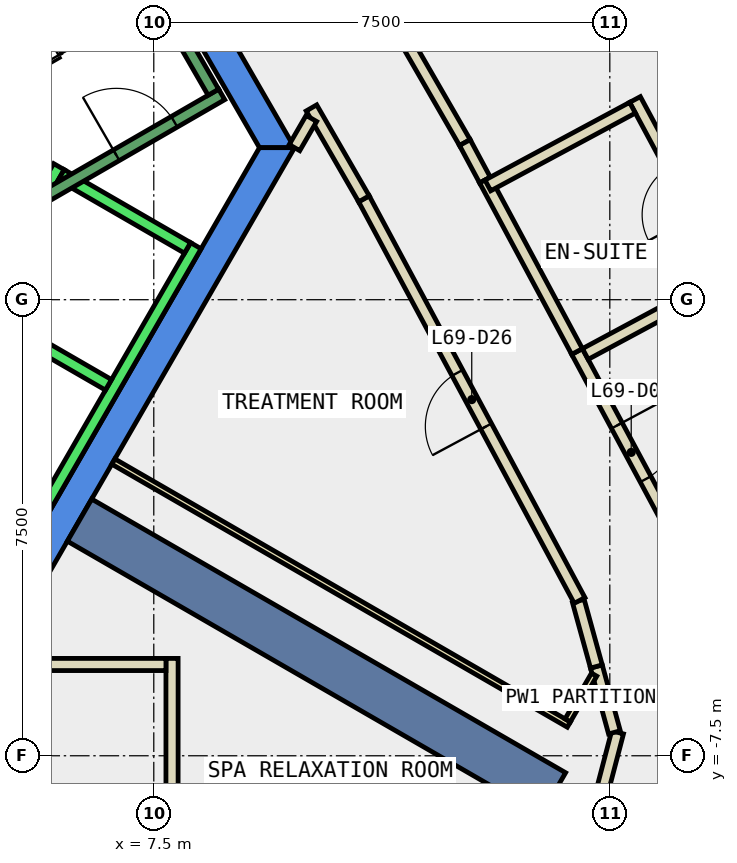
"""IFC4 building model, lengths in metres.
Left out: names, types, materials, properties, quantities, classifications, styles, units other than length and angle.
Written with IfcOpenShell. Run it as: python <this file> out.ifc"""

import sys

from ifc_helpers import new_model, si_unit, direction, frame, frame_2d, origin, place, context, subcontext, project, spatial, polyline, rectangle, outline, extrude, element, fill, save


model = new_model("IFC4")
c1 = context("Model", 3, precision=1e-05, world=origin(), true_north=direction((0.0, 1.0)))
c2 = subcontext(c1, "Body", "Model", "MODEL_VIEW")
j1 = project(units=[si_unit("LENGTHUNIT", "METRE"), si_unit("PLANEANGLEUNIT", "RADIAN")], contexts=[c1])
p1 = place(None, origin())
s1 = spatial("IfcSite", under=j1, at=p1, CompositionType="ELEMENT")
p2 = place(p1, origin())
s2 = spatial("IfcBuilding", under=s1, at=p2, CompositionType="ELEMENT")
p3 = place(p2, frame((0.0, 0.0, 297.2)))
s3 = spatial("IfcBuildingStorey", under=s2, at=p3, CompositionType="ELEMENT", Elevation=297.2)
p4 = place(p3, frame((0.0, 0.0, -0.34)))
e1 = element("IfcWall", 1, at=p4, inside=s3, PredefinedType="SHEAR", context=c2, shape_type="SweptSolid", body=[
    extrude(outline(polyline([(5.486, 9.998), (5.053, 9.748), (9.238, 2.5), (9.815, 2.5), (5.486, 9.998)])), origin(), (0.0, 0.0, 1.0), 3.6),
])
p5 = place(p3, frame((0.0, 0.0, -0.34)))
e2 = element("IfcWall", 2, at=p5, inside=s3, PredefinedType="SHEAR", context=c2, shape_type="SweptSolid", body=[
    extrude(outline(polyline([(4.907, -6.0), (9.815, 2.5), (9.238, 2.5), (4.619, -5.5), (4.907, -6.0)])), origin(), (0.0, 0.0, 1.0), 3.6),
])
p6 = place(p3, frame((6.279, -3.625, -0.34), z_axis=(0.0, 0.0, 1.0), x_axis=(0.866017533419, -0.500013631625, 0.0)))
e3 = element("IfcWall", 3, at=p6, inside=s3, PredefinedType="SHEAR", context=c2, shape_type="SweptSolid", body=[
    extrude(rectangle(XDim=9.0, YDim=0.8, at=frame_2d((4.5, 0.0))), origin(), (0.0, 0.0, 1.0), 3.6),
])
p7 = place(p3, frame((14.785, -8.425, 0.0), z_axis=(0.0, 0.0, 1.0), x_axis=(0.253295121261, 0.967389053869, 0.0)))
e4 = element("IfcWall", 4, at=p7, inside=s3, PredefinedType="PARTITIONING", context=c2, shape_type="SweptSolid", body=[
    extrude(rectangle(XDim=1.354, YDim=0.2, at=frame_2d((0.677, 0.0))), origin(), (0.0, 0.0, 1.0), 3.26),
])
p8 = place(p3, frame((15.076, -7.115, 0.0), z_axis=(0.0, 0.0, 1.0), x_axis=(-0.264368116744, 0.964421846937, 0.0)))
e5 = element("IfcWall", 5, at=p8, inside=s3, PredefinedType="PARTITIONING", context=c2, shape_type="SweptSolid", body=[
    extrude(rectangle(XDim=1.123, YDim=0.2, at=frame_2d((0.562, 0.0))), origin(), (0.0, 0.0, 1.0), 3.26),
])
p9 = place(p3, frame((14.779, -6.032, 0.0), z_axis=(0.0, 0.0, 1.0), x_axis=(-0.265740072272, 0.964044715762, 0.0)))
e6 = element("IfcWall", 6, at=p9, inside=s3, PredefinedType="PARTITIONING", context=c2, shape_type="SweptSolid", body=[
    extrude(rectangle(XDim=1.118, YDim=0.2, at=frame_2d((0.559, 0.0))), origin(), (0.0, 0.0, 1.0), 3.26),
])
p10 = place(p3, frame((14.503, -4.946, 0.0), z_axis=(0.0, 0.0, 1.0), x_axis=(-0.473101362557, 0.881008002658, 0.0)))
e7 = element("IfcWall", 7, at=p10, inside=s3, PredefinedType="PARTITIONING", context=c2, shape_type="SweptSolid", body=[
    extrude(rectangle(XDim=7.497, YDim=0.2, at=frame_2d((3.749, 0.0))), origin(), (0.0, 0.0, 1.0), 3.26),
])
p11 = place(p10, frame((3.249, 0.0, 0.0)))
e8 = element("IfcOpeningElement", 8, at=p11, cuts=e7, PredefinedType="OPENING", context=c2, shape_type="SweptSolid", body=[
    extrude(rectangle(XDim=1.0, YDim=2.1, at=frame_2d((0.5, 1.05))), frame((0.0, 0.11, 0.0), z_axis=(0.0, -1.0, 0.0), x_axis=(1.0, 0.0, 0.0)), (0.0, 0.0, 1.0), 0.22),
])
p12 = place(p3, frame((10.956, 1.659, 0.0), z_axis=(0.0, 0.0, 1.0), x_axis=(-0.49992648901, 0.866067841215, 0.0)))
e9 = element("IfcWall", 9, at=p12, inside=s3, PredefinedType="PARTITIONING", context=c2, shape_type="SweptSolid", body=[
    extrude(rectangle(XDim=1.726, YDim=0.2, at=frame_2d((0.863, 0.0))), origin(), (0.0, 0.0, 1.0), 3.26),
])
p13 = place(p3, frame((10.092, 2.981, 0.0), z_axis=(0.0, 0.0, 1.0), x_axis=(-0.501296484717, -0.865275582927, 0.0)))
e10 = element("IfcWall", 10, at=p13, inside=s3, PredefinedType="PARTITIONING", context=c2, shape_type="SweptSolid", body=[
    extrude(rectangle(XDim=0.555, YDim=0.2, at=frame_2d((0.277, 0.0))), origin(), (0.0, 0.0, 1.0), 3.26),
])
p14 = place(p3, frame((14.461, -0.852, 0.0), z_axis=(0.0, 0.0, 1.0), x_axis=(0.473160180459, -0.88097641491, 0.0)))
e11 = element("IfcWall", 11, at=p14, inside=s3, PredefinedType="PARTITIONING", context=c2, shape_type="SweptSolid", body=[
    extrude(rectangle(XDim=3.766, YDim=0.2, at=frame_2d((1.883, 0.0))), origin(), (0.0, 0.0, 1.0), 3.26),
])
p15 = place(p14, frame((1.383, 0.0, 0.0)))
e12 = element("IfcOpeningElement", 12, at=p15, cuts=e11, PredefinedType="OPENING", context=c2, shape_type="SweptSolid", body=[
    extrude(rectangle(XDim=1.0, YDim=2.1, at=frame_2d((0.5, 1.05))), frame((0.0, 0.11, 0.0), z_axis=(0.0, -1.0, 0.0), x_axis=(1.0, 0.0, 0.0)), (0.0, 0.0, 1.0), 0.22),
])
p16 = place(p3, frame((10.618, 6.044, 0.0), z_axis=(0.0, 0.0, 1.0), x_axis=(0.50008212199, -0.86597798544, 0.0)))
e13 = element("IfcWall", 13, at=p16, inside=s3, PredefinedType="PARTITIONING", context=c2, shape_type="SweptSolid", body=[
    extrude(rectangle(XDim=3.995, YDim=0.2, at=frame_2d((1.998, 0.0))), origin(), (0.0, 0.0, 1.0), 3.26),
])
p17 = place(p3, frame((12.616, 2.584, 0.0), z_axis=(0.0, 0.0, 1.0), x_axis=(0.472830911699, -0.881153181315, 0.0)))
e14 = element("IfcWall", 14, at=p17, inside=s3, PredefinedType="PARTITIONING", context=c2, shape_type="SweptSolid", body=[
    extrude(rectangle(XDim=0.7, YDim=0.2, at=frame_2d((0.35, 0.0))), origin(), (0.0, 0.0, 1.0), 3.26),
])
p18 = place(p3, frame((12.947, 1.967, 0.0), z_axis=(0.0, 0.0, 1.0), x_axis=(0.473116768279, -0.88099972961, 0.0)))
e15 = element("IfcWall", 15, at=p18, inside=s3, PredefinedType="PARTITIONING", context=c2, shape_type="SweptSolid", body=[
    extrude(rectangle(XDim=3.2, YDim=0.2, at=frame_2d((1.6, 0.0))), origin(), (0.0, 0.0, 1.0), 3.26),
])
p19 = place(p3, frame((7.8, -5.899, 0.0), z_axis=(0.0, 0.0, 1.0), x_axis=(0.0, -1.0, 0.0)))
e16 = element("IfcWall", 16, at=p19, inside=s3, PredefinedType="PARTITIONING", context=c2, shape_type="SweptSolid", body=[
    extrude(rectangle(XDim=4.66, YDim=0.2, at=frame_2d((2.33, 0.0))), origin(), (0.0, 0.0, 1.0), 3.26),
])
p20 = place(p3, frame((6.835, -2.662, 0.0), z_axis=(0.0, 0.0, 1.0), x_axis=(0.866023427642, -0.500003422764, 0.0)))
e17 = element("IfcWall", 17, at=p20, inside=s3, PredefinedType="PARTITIONING", context=c2, shape_type="SweptSolid", body=[
    extrude(rectangle(XDim=8.65, YDim=0.1, at=frame_2d((4.325, 0.0))), origin(), (0.0, 0.0, 1.0), 3.26),
])
p21 = place(p3, frame((14.307, -6.919, 0.0), z_axis=(0.0, 0.0, 1.0), x_axis=(0.500305662732, 0.865848857387, 0.0)))
e18 = element("IfcWall", 18, at=p21, inside=s3, PredefinedType="PARTITIONING", context=c2, shape_type="SweptSolid", body=[
    extrude(rectangle(XDim=0.87, YDim=0.1, at=frame_2d((0.435, 0.0))), origin(), (0.0, 0.0, 1.0), 3.26),
])
p22 = place(p3, frame((14.597, -0.893, 0.0), z_axis=(0.0, 0.0, 1.0), x_axis=(0.880971229432, 0.473169835168, 0.0)))
e19 = element("IfcWall", 19, at=p22, inside=s3, PredefinedType="PARTITIONING", context=c2, shape_type="SweptSolid", body=[
    extrude(rectangle(XDim=2.599, YDim=0.2, at=frame_2d((1.3, 0.0))), origin(), (0.0, 0.0, 1.0), 3.26),
])
p23 = place(p3, frame((17.023, 0.297, 0.0), z_axis=(0.0, 0.0, 1.0), x_axis=(-0.473247398557, 0.88092956572, 0.0)))
e20 = element("IfcWall", 20, at=p23, inside=s3, PredefinedType="PARTITIONING", context=c2, shape_type="SweptSolid", body=[
    extrude(rectangle(XDim=3.4, YDim=0.2, at=frame_2d((1.7, 0.0))), origin(), (0.0, 0.0, 1.0), 3.26),
])
p24 = place(p23, frame((1.25, 0.0, 0.0)))
e21 = element("IfcOpeningElement", 21, at=p24, cuts=e20, PredefinedType="OPENING", context=c2, shape_type="SweptSolid", body=[
    extrude(rectangle(XDim=0.9, YDim=2.1, at=frame_2d((0.45, 1.05))), frame((0.0, 0.11, 0.0), z_axis=(0.0, -1.0, 0.0), x_axis=(1.0, 0.0, 0.0)), (0.0, 0.0, 1.0), 0.22),
])
p25 = place(p3, frame((15.373, 3.157, 0.0), z_axis=(0.0, 0.0, 1.0), x_axis=(-0.880935111027, -0.473237076062, 0.0)))
e22 = element("IfcWall", 22, at=p25, inside=s3, PredefinedType="PARTITIONING", context=c2, shape_type="SweptSolid", body=[
    extrude(rectangle(XDim=2.701, YDim=0.2, at=frame_2d((1.35, 0.0))), origin(), (0.0, 0.0, 1.0), 3.26),
])
p26 = place(p3, frame((5.076, -5.999, 0.0), z_axis=(0.0, 0.0, 1.0), x_axis=(1.0, 0.0, 0.0)))
e23 = element("IfcWall", 23, at=p26, inside=s3, PredefinedType="PARTITIONING", context=c2, shape_type="SweptSolid", body=[
    extrude(rectangle(XDim=2.624, YDim=0.2, at=frame_2d((1.312, 0.0))), origin(), (0.0, 0.0, 1.0), 3.26),
])
p27 = place(p3, frame((3.24, -2.488, 0.0), z_axis=(0.0, 0.0, 1.0), x_axis=(0.500034260056, 0.866005622828, 0.0)))
e24 = element("IfcWall", 24, at=p27, inside=s3, PredefinedType="STANDARD", context=c2, shape_type="SweptSolid", body=[
    extrude(rectangle(XDim=5.399, YDim=0.2, at=frame_2d((2.7, 0.0))), origin(), (0.0, 0.0, 1.0), 3.26),
])
p28 = place(p27, frame((3.225, 0.0, 0.0)))
e25 = element("IfcOpeningElement", 25, at=p28, cuts=e24, PredefinedType="OPENING", context=c2, shape_type="SweptSolid", body=[
    extrude(rectangle(XDim=1.1, YDim=2.1, at=frame_2d((0.55, 1.05))), frame((0.0, 0.11, 0.0), z_axis=(0.0, -1.0, 0.0), x_axis=(1.0, 0.0, 0.0)), (0.0, 0.0, 1.0), 0.22),
])
p29 = place(p27, frame((1.225, 0.0, 0.0)))
e26 = element("IfcOpeningElement", 26, at=p29, cuts=e24, PredefinedType="OPENING", context=c2, shape_type="SweptSolid", body=[
    extrude(rectangle(XDim=1.1, YDim=2.1, at=frame_2d((0.55, 1.05))), frame((0.0, 0.11, 0.0), z_axis=(0.0, -1.0, 0.0), x_axis=(1.0, 0.0, 0.0)), (0.0, 0.0, 1.0), 0.22),
])
p30 = place(p3, frame((5.492, -3.788, 0.0), z_axis=(0.0, 0.0, 1.0), x_axis=(0.500034260056, 0.866005622828, 0.0)))
e27 = element("IfcWall", 27, at=p30, inside=s3, PredefinedType="STANDARD", context=c2, shape_type="SweptSolid", body=[
    extrude(rectangle(XDim=5.399, YDim=0.2, at=frame_2d((2.7, 0.0))), origin(), (0.0, 0.0, 1.0), 3.26),
])
for number, where, z_axis, x_axis in (
    (28, (4.677, -0.2, 0.0), (0.0, 0.0, 1.0), (0.866, -0.5, 0.0)),
    (29, (5.977, 2.052, 0.0), (0.0, 0.0, 1.0), (0.866, -0.5, 0.0)),
):
    element("IfcWall", number, at=place(p3, frame(where, z_axis=z_axis, x_axis=x_axis)), inside=s3, PredefinedType="STANDARD", context=c2, shape_type="SweptSolid", body=[
        extrude(rectangle(XDim=2.399, YDim=0.2, at=frame_2d((1.2, 0.0))), origin(), (0.0, 0.0, 1.0), 3.26),
    ])
p31 = place(p3, frame((4.806, 1.176, 0.0), z_axis=(0.0, 0.0, 1.0), x_axis=(0.866059941101, 0.499940174841, 0.0)))
e30 = element("IfcWall", 30, at=p31, inside=s3, PredefinedType="STANDARD", context=c2, shape_type="SweptSolid", body=[
    extrude(rectangle(XDim=4.4, YDim=0.2, at=frame_2d((2.2, 0.0))), origin(), (0.0, 0.0, 1.0), 3.26),
])
p32 = place(p31, frame((2.4, 0.0, 0.0)))
e31 = element("IfcOpeningElement", 31, at=p32, cuts=e30, PredefinedType="OPENING", context=c2, shape_type="SweptSolid", body=[
    extrude(rectangle(XDim=1.1, YDim=2.2, at=frame_2d((0.55, 1.1))), frame((0.0, 0.11, 0.0), z_axis=(0.0, -1.0, 0.0), x_axis=(1.0, 0.0, 0.0)), (0.0, 0.0, 1.0), 0.22),
])
p33 = place(p3, frame((8.48, 3.412, 0.0), z_axis=(0.0, 0.0, 1.0), x_axis=(-0.499978703459, 0.866037698999, 0.0)))
e32 = element("IfcWall", 32, at=p33, inside=s3, PredefinedType="STANDARD", context=c2, shape_type="SweptSolid", body=[
    extrude(rectangle(XDim=6.9, YDim=0.2, at=frame_2d((3.45, 0.0))), origin(), (0.0, 0.0, 1.0), 3.26),
])
p34 = place(p15, origin())
e33 = element("IfcDoor", 33, at=p34, inside=s3, OperationType="SINGLE_SWING_LEFT", PredefinedType="DOOR", context=c2, shape_type="SweptSolid", body=[
    extrude(rectangle(XDim=1.0, YDim=2.1, at=frame_2d((0.5, 1.05))), frame((0.0, 0.025, 0.0), z_axis=(0.0, -1.0, 0.0), x_axis=(1.0, 0.0, 0.0)), (0.0, 0.0, 1.0), 0.05),
])
fill(e12, e33)
p35 = place(p11, origin())
e34 = element("IfcDoor", 34, at=p35, inside=s3, OperationType="SINGLE_SWING_LEFT", PredefinedType="DOOR", context=c2, shape_type="SweptSolid", body=[
    extrude(rectangle(XDim=1.0, YDim=2.1, at=frame_2d((0.5, 1.05))), frame((0.0, 0.025, 0.0), z_axis=(0.0, -1.0, 0.0), x_axis=(1.0, 0.0, 0.0)), (0.0, 0.0, 1.0), 0.05),
])
fill(e8, e34)
p36 = place(p32, origin())
e35 = element("IfcDoor", 35, at=p36, inside=s3, OperationType="SINGLE_SWING_LEFT", PredefinedType="DOOR", context=c2, shape_type="SweptSolid", body=[
    extrude(rectangle(XDim=1.1, YDim=2.2, at=frame_2d((0.55, 1.1))), frame((0.0, 0.025, 0.0), z_axis=(0.0, -1.0, 0.0), x_axis=(1.0, 0.0, 0.0)), (0.0, 0.0, 1.0), 0.05),
])
fill(e31, e35)
save(model, sys.argv[1])
